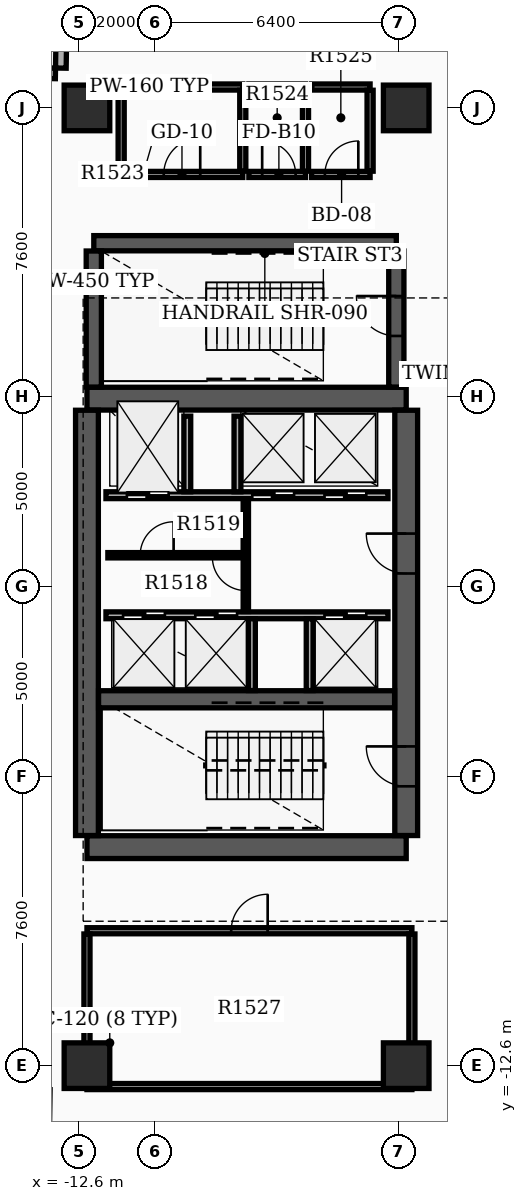
"""IFC4 building model, lengths in metres.
Left out: names, types, materials, properties, quantities, classifications, styles, units other than length and angle.
Written with IfcOpenShell. Run it as: python <this file> out.ifc"""

import sys

from ifc_helpers import new_model, si_unit, direction, frame, frame_2d, origin, origin_2d, place, context, subcontext, project, spatial, rectangle, extrude, element, fill, save


model = new_model("IFC4")
c1 = context("Model", 3, precision=1e-05, world=origin(), true_north=direction((0.0, 1.0)))
c2 = subcontext(c1, "Body", "Model", "MODEL_VIEW")
j1 = project(units=[si_unit("LENGTHUNIT", "METRE"), si_unit("PLANEANGLEUNIT", "RADIAN")], contexts=[c1])
p1 = place(None, origin())
s1 = spatial("IfcSite", under=j1, at=p1, CompositionType="ELEMENT")
p2 = place(p1, origin())
s2 = spatial("IfcBuilding", under=s1, at=p2, CompositionType="ELEMENT")
p3 = place(p2, frame((0.0, 0.0, 100.2)))
s3 = spatial("IfcBuildingStorey", under=s2, at=p3, CompositionType="ELEMENT", Elevation=100.2)
for number, where, z_axis, x_axis in (
    (1, (-12.4, -6.85, 0.0), (0.0, 0.0, 1.0), (1.0, 0.0, 0.0)),
    (2, (-12.4, 4.95, 0.0), (0.0, 0.0, 1.0), (1.0, 0.0, 0.0)),
):
    element("IfcWall", number, at=place(p3, frame(where, z_axis=z_axis, x_axis=x_axis)), inside=s3, PredefinedType="SHEAR", context=c2, shape_type="SweptSolid", body=[
        extrude(rectangle(XDim=8.4, YDim=0.6, at=frame_2d((4.2, 0.0))), origin(), (0.0, 0.0, 1.0), 4.3),
    ])
p4 = place(p3, frame((-12.4, -6.545, 0.0), z_axis=(0.0, 0.0, 1.0), x_axis=(0.0, 1.0, 0.0)))
e3 = element("IfcWall", 3, at=p4, inside=s3, PredefinedType="SHEAR", context=c2, shape_type="SweptSolid", body=[
    extrude(rectangle(XDim=11.19, YDim=0.6, at=frame_2d((5.595, 0.0))), origin(), (0.0, 0.0, 1.0), 4.3),
])
p5 = place(p3, frame((-4.0, -6.545, 0.0), z_axis=(0.0, 0.0, 1.0), x_axis=(0.0, 1.0, 0.0)))
e4 = element("IfcWall", 4, at=p5, inside=s3, PredefinedType="SHEAR", context=c2, shape_type="SweptSolid", body=[
    extrude(rectangle(XDim=11.19, YDim=0.6, at=frame_2d((5.595, 0.0))), origin(), (0.0, 0.0, 1.0), 4.3),
])
p6 = place(p5, frame((1.295, 0.0, 0.0)))
e5 = element("IfcOpeningElement", 5, at=p6, cuts=e4, PredefinedType="OPENING", context=c2, shape_type="SweptSolid", body=[
    extrude(rectangle(XDim=1.05, YDim=2.15, at=frame_2d((0.525, 1.075))), frame((0.0, 0.31, 0.0), z_axis=(0.0, -1.0, 0.0), x_axis=(1.0, 0.0, 0.0)), (0.0, 0.0, 1.0), 0.62),
])
p7 = place(p5, frame((6.895, 0.0, 0.0)))
e6 = element("IfcOpeningElement", 6, at=p7, cuts=e4, PredefinedType="OPENING", context=c2, shape_type="SweptSolid", body=[
    extrude(rectangle(XDim=1.05, YDim=2.15, at=frame_2d((0.525, 1.075))), frame((0.0, 0.31, 0.0), z_axis=(0.0, -1.0, 0.0), x_axis=(1.0, 0.0, 0.0)), (0.0, 0.0, 1.0), 0.62),
])
p8 = place(p3, frame((-12.095, -2.96, 0.0), z_axis=(0.0, 0.0, 1.0), x_axis=(1.0, 0.0, 0.0)))
e7 = element("IfcWall", 7, at=p8, inside=s3, PredefinedType="SHEAR", context=c2, shape_type="SweptSolid", body=[
    extrude(rectangle(XDim=7.79, YDim=0.45, at=frame_2d((3.895, 0.0))), origin(), (0.0, 0.0, 1.0), 4.3),
])
p9 = place(p3, frame((-12.22, 9.04, 0.0), z_axis=(0.0, 0.0, 1.0), x_axis=(1.0, 0.0, 0.0)))
e8 = element("IfcWall", 8, at=p9, inside=s3, PredefinedType="SHEAR", context=c2, shape_type="SweptSolid", body=[
    extrude(rectangle(XDim=7.96, YDim=0.4, at=frame_2d((3.98, 0.0))), origin(), (0.0, 0.0, 1.0), 4.3),
])
p10 = place(p3, frame((-12.22, 5.255, 0.0), z_axis=(0.0, 0.0, 1.0), x_axis=(0.0, 1.0, 0.0)))
e9 = element("IfcWall", 9, at=p10, inside=s3, PredefinedType="SHEAR", context=c2, shape_type="SweptSolid", body=[
    extrude(rectangle(XDim=3.58, YDim=0.4, at=frame_2d((1.79, 0.0))), origin(), (0.0, 0.0, 1.0), 4.3),
])
p11 = place(p3, frame((-4.26, 5.255, 0.0), z_axis=(0.0, 0.0, 1.0), x_axis=(0.0, 1.0, 0.0)))
e10 = element("IfcWall", 10, at=p11, inside=s3, PredefinedType="SHEAR", context=c2, shape_type="SweptSolid", body=[
    extrude(rectangle(XDim=3.58, YDim=0.4, at=frame_2d((1.79, 0.0))), origin(), (0.0, 0.0, 1.0), 4.3),
])
p12 = place(p11, frame((1.345, 0.0, 0.0)))
e11 = element("IfcOpeningElement", 11, at=p12, cuts=e10, PredefinedType="OPENING", context=c2, shape_type="SweptSolid", body=[
    extrude(rectangle(XDim=1.05, YDim=2.15, at=frame_2d((0.525, 1.075))), frame((0.0, 0.21, 0.0), z_axis=(0.0, -1.0, 0.0), x_axis=(1.0, 0.0, 0.0)), (0.0, 0.0, 1.0), 0.42),
])
for number, where, z_axis, x_axis in (
    (12, (-12.4, -12.6, 0.0), (0.0, 0.0, 1.0), (1.0, 0.0, 0.0)),
    (13, (-12.4, 12.6, 0.0), (0.0, 0.0, 1.0), (1.0, 0.0, 0.0)),
    (14, (-4.0, -12.6, 0.0), (0.0, 0.0, 1.0), (1.0, 0.0, 0.0)),
    (15, (-4.0, 12.6, 0.0), (0.0, 0.0, 1.0), (1.0, 0.0, 0.0)),
):
    element("IfcColumn", number, at=place(p3, frame(where, z_axis=z_axis, x_axis=x_axis)), inside=s3, PredefinedType="COLUMN", context=c2, shape_type="SweptSolid", body=[
        extrude(rectangle(XDim=1.2, YDim=1.2, at=origin_2d()), origin(), (0.0, 0.0, 1.0), 4.5),
    ])
p13 = place(p3, frame((-14.449, 13.529, 0.0), z_axis=(0.0, 0.0, 1.0), x_axis=(0.999878147354, -0.015610587569, 0.0)))
e16 = element("IfcWall", 16, at=p13, inside=s3, PredefinedType="STANDARD", context=c2, shape_type="SweptSolid", body=[
    extrude(rectangle(XDim=1.22, YDim=0.28, at=frame_2d((0.61, 0.0))), origin(), (0.0, 0.0, 1.0), 3.38),
])
p14 = place(p3, frame((-13.087, 13.647, 0.0), z_axis=(0.0, 0.0, 1.0), x_axis=(0.015785793208, 0.999875396603, 0.0)))
e17 = element("IfcWall", 17, at=p14, inside=s3, PredefinedType="STANDARD", context=c2, shape_type="SweptSolid", body=[
    extrude(rectangle(XDim=1.5, YDim=0.28, at=frame_2d((0.75, 0.0))), origin(), (0.0, 0.0, 1.0), 3.38),
])
p15 = place(p3, frame((-11.9, 2.41, 0.0), z_axis=(0.0, 0.0, 1.0), x_axis=(1.0, 0.0, 0.0)))
e18 = element("IfcWall", 18, at=p15, inside=s3, PredefinedType="SOLIDWALL", context=c2, shape_type="SweptSolid", body=[
    extrude(rectangle(XDim=7.42, YDim=0.18, at=frame_2d((3.71, 0.0))), origin(), (0.0, 0.0, 1.0), 3.37),
])
p16 = place(p15, frame((0.55, 0.0, 0.0)))
e19 = element("IfcOpeningElement", 19, at=p16, cuts=e18, PredefinedType="OPENING", context=c2, shape_type="SweptSolid", body=[
    extrude(rectangle(XDim=1.1, YDim=2.15, at=frame_2d((0.55, 1.075))), frame((0.0, 0.1, 0.0), z_axis=(0.0, -1.0, 0.0), x_axis=(1.0, 0.0, 0.0)), (0.0, 0.0, 1.0), 0.2),
])
p17 = place(p15, frame((3.85, 0.0, 0.0)))
e20 = element("IfcOpeningElement", 20, at=p17, cuts=e18, PredefinedType="OPENING", context=c2, shape_type="SweptSolid", body=[
    extrude(rectangle(XDim=1.1, YDim=2.15, at=frame_2d((0.55, 1.075))), frame((0.0, 0.1, 0.0), z_axis=(0.0, -1.0, 0.0), x_axis=(1.0, 0.0, 0.0)), (0.0, 0.0, 1.0), 0.2),
])
p18 = place(p15, frame((5.75, 0.0, 0.0)))
e21 = element("IfcOpeningElement", 21, at=p18, cuts=e18, PredefinedType="OPENING", context=c2, shape_type="SweptSolid", body=[
    extrude(rectangle(XDim=1.1, YDim=2.15, at=frame_2d((0.55, 1.075))), frame((0.0, 0.1, 0.0), z_axis=(0.0, -1.0, 0.0), x_axis=(1.0, 0.0, 0.0)), (0.0, 0.0, 1.0), 0.2),
])
p19 = place(p3, frame((-11.9, -0.75, 0.0), z_axis=(0.0, 0.0, 1.0), x_axis=(1.0, 0.0, 0.0)))
e22 = element("IfcWall", 22, at=p19, inside=s3, PredefinedType="SOLIDWALL", context=c2, shape_type="SweptSolid", body=[
    extrude(rectangle(XDim=7.42, YDim=0.18, at=frame_2d((3.71, 0.0))), origin(), (0.0, 0.0, 1.0), 3.37),
])
p20 = place(p19, frame((0.45, 0.0, 0.0)))
e23 = element("IfcOpeningElement", 23, at=p20, cuts=e22, PredefinedType="OPENING", context=c2, shape_type="SweptSolid", body=[
    extrude(rectangle(XDim=1.1, YDim=2.15, at=frame_2d((0.55, 1.075))), frame((0.0, 0.1, 0.0), z_axis=(0.0, -1.0, 0.0), x_axis=(1.0, 0.0, 0.0)), (0.0, 0.0, 1.0), 0.2),
])
p21 = place(p19, frame((2.35, 0.0, 0.0)))
e24 = element("IfcOpeningElement", 24, at=p21, cuts=e22, PredefinedType="OPENING", context=c2, shape_type="SweptSolid", body=[
    extrude(rectangle(XDim=1.1, YDim=2.15, at=frame_2d((0.55, 1.075))), frame((0.0, 0.1, 0.0), z_axis=(0.0, -1.0, 0.0), x_axis=(1.0, 0.0, 0.0)), (0.0, 0.0, 1.0), 0.2),
])
p22 = place(p19, frame((5.75, 0.0, 0.0)))
e25 = element("IfcOpeningElement", 25, at=p22, cuts=e22, PredefinedType="OPENING", context=c2, shape_type="SweptSolid", body=[
    extrude(rectangle(XDim=1.1, YDim=2.15, at=frame_2d((0.55, 1.075))), frame((0.0, 0.1, 0.0), z_axis=(0.0, -1.0, 0.0), x_axis=(1.0, 0.0, 0.0)), (0.0, 0.0, 1.0), 0.2),
])
for number, where, z_axis, x_axis in (
    (26, (-9.76, 2.5, 0.0), (0.0, 0.0, 1.0), (0.0, 1.0, 0.0)),
    (27, (-8.44, 2.5, 0.0), (0.0, 0.0, 1.0), (0.0, 1.0, 0.0)),
):
    element("IfcWall", number, at=place(p3, frame(where, z_axis=z_axis, x_axis=x_axis)), inside=s3, PredefinedType="SOLIDWALL", context=c2, shape_type="SweptSolid", body=[
        extrude(rectangle(XDim=1.99, YDim=0.18, at=frame_2d((0.995, 0.0))), origin(), (0.0, 0.0, 1.0), 3.37),
    ])
for number, where, z_axis, x_axis in (
    (28, (-8.06, -2.73, 0.0), (0.0, 0.0, 1.0), (0.0, 1.0, 0.0)),
    (29, (-6.54, -2.73, 0.0), (0.0, 0.0, 1.0), (0.0, 1.0, 0.0)),
):
    element("IfcWall", number, at=place(p3, frame(where, z_axis=z_axis, x_axis=x_axis)), inside=s3, PredefinedType="SOLIDWALL", context=c2, shape_type="SweptSolid", body=[
        extrude(rectangle(XDim=1.89, YDim=0.18, at=frame_2d((0.945, 0.0))), origin(), (0.0, 0.0, 1.0), 3.37),
    ])
p23 = place(p3, frame((-8.22, -0.65, 0.0), z_axis=(0.0, 0.0, 1.0), x_axis=(0.0, 1.0, 0.0)))
e30 = element("IfcWall", 30, at=p23, inside=s3, PredefinedType="SOLIDWALL", context=c2, shape_type="SweptSolid", body=[
    extrude(rectangle(XDim=2.96, YDim=0.14, at=frame_2d((1.48, 0.0))), origin(), (0.0, 0.0, 1.0), 3.37),
])
p24 = place(p23, frame((0.55, 0.0, 0.0)))
e31 = element("IfcOpeningElement", 31, at=p24, cuts=e30, PredefinedType="OPENING", context=c2, shape_type="SweptSolid", body=[
    extrude(rectangle(XDim=0.88, YDim=2.1, at=frame_2d((0.44, 1.05))), frame((0.0, 0.08, 0.0), z_axis=(0.0, -1.0, 0.0), x_axis=(1.0, 0.0, 0.0)), (0.0, 0.0, 1.0), 0.16),
])
p25 = place(p3, frame((-11.85, 0.83, 0.0), z_axis=(0.0, 0.0, 1.0), x_axis=(1.0, 0.0, 0.0)))
e32 = element("IfcWall", 32, at=p25, inside=s3, PredefinedType="PARTITIONING", context=c2, shape_type="SweptSolid", body=[
    extrude(rectangle(XDim=3.552, YDim=0.14, at=frame_2d((1.776, 0.0))), origin(), (0.0, 0.0, 1.0), 3.37),
])
p26 = place(p25, frame((0.85, 0.0, 0.0)))
e33 = element("IfcOpeningElement", 33, at=p26, cuts=e32, PredefinedType="OPENING", context=c2, shape_type="SweptSolid", body=[
    extrude(rectangle(XDim=0.88, YDim=2.1, at=frame_2d((0.44, 1.05))), frame((0.0, 0.08, 0.0), z_axis=(0.0, -1.0, 0.0), x_axis=(1.0, 0.0, 0.0)), (0.0, 0.0, 1.0), 0.16),
])
p27 = place(p3, frame((-11.5, 10.85, 0.0), z_axis=(0.0, 0.0, 1.0), x_axis=(1.0, 0.0, 0.0)))
e34 = element("IfcWall", 34, at=p27, inside=s3, PredefinedType="PARTITIONING", context=c2, shape_type="SweptSolid", body=[
    extrude(rectangle(XDim=3.2, YDim=0.16, at=frame_2d((1.6, 0.0))), origin(), (0.0, 0.0, 1.0), 3.37),
])
p28 = place(p27, frame((1.12, 0.0, 0.0)))
e35 = element("IfcOpeningElement", 35, at=p28, cuts=e34, PredefinedType="OPENING", context=c2, shape_type="SweptSolid", body=[
    extrude(rectangle(XDim=0.96, YDim=2.15, at=frame_2d((0.48, 1.075))), frame((0.0, 0.09, 0.0), z_axis=(0.0, -1.0, 0.0), x_axis=(1.0, 0.0, 0.0)), (0.0, 0.0, 1.0), 0.18),
])
p29 = place(p3, frame((-11.5, 13.15, 0.0), z_axis=(0.0, 0.0, 1.0), x_axis=(1.0, 0.0, 0.0)))
e36 = element("IfcWall", 36, at=p29, inside=s3, PredefinedType="PARTITIONING", context=c2, shape_type="SweptSolid", body=[
    extrude(rectangle(XDim=3.2, YDim=0.16, at=frame_2d((1.6, 0.0))), origin(), (0.0, 0.0, 1.0), 3.37),
])
for number, where, z_axis, x_axis in (
    (37, (-11.5, 10.935, 0.0), (0.0, 0.0, 1.0), (0.0, 1.0, 0.0)),
    (38, (-8.3, 10.935, 0.0), (0.0, 0.0, 1.0), (0.0, 1.0, 0.0)),
):
    element("IfcWall", number, at=place(p3, frame(where, z_axis=z_axis, x_axis=x_axis)), inside=s3, PredefinedType="PARTITIONING", context=c2, shape_type="SweptSolid", body=[
        extrude(rectangle(XDim=2.13, YDim=0.16, at=frame_2d((1.065, 0.0))), origin(), (0.0, 0.0, 1.0), 3.37),
    ])
p30 = place(p3, frame((-8.14, 10.85, 0.0), z_axis=(0.0, 0.0, 1.0), x_axis=(1.0, 0.0, 0.0)))
e39 = element("IfcWall", 39, at=p30, inside=s3, PredefinedType="PARTITIONING", context=c2, shape_type="SweptSolid", body=[
    extrude(rectangle(XDim=1.49, YDim=0.16, at=frame_2d((0.745, 0.0))), origin(), (0.0, 0.0, 1.0), 3.37),
])
p31 = place(p30, frame((0.35, 0.0, 0.0)))
e40 = element("IfcOpeningElement", 40, at=p31, cuts=e39, PredefinedType="OPENING", context=c2, shape_type="SweptSolid", body=[
    extrude(rectangle(XDim=0.88, YDim=2.1, at=frame_2d((0.44, 1.05))), frame((0.0, 0.09, 0.0), z_axis=(0.0, -1.0, 0.0), x_axis=(1.0, 0.0, 0.0)), (0.0, 0.0, 1.0), 0.18),
])
p32 = place(p3, frame((-8.14, 13.15, 0.0), z_axis=(0.0, 0.0, 1.0), x_axis=(1.0, 0.0, 0.0)))
e41 = element("IfcWall", 41, at=p32, inside=s3, PredefinedType="PARTITIONING", context=c2, shape_type="SweptSolid", body=[
    extrude(rectangle(XDim=1.49, YDim=0.16, at=frame_2d((0.745, 0.0))), origin(), (0.0, 0.0, 1.0), 3.37),
])
p33 = place(p3, frame((-6.65, 10.935, 0.0), z_axis=(0.0, 0.0, 1.0), x_axis=(0.0, 1.0, 0.0)))
e42 = element("IfcWall", 42, at=p33, inside=s3, PredefinedType="PARTITIONING", context=c2, shape_type="SweptSolid", body=[
    extrude(rectangle(XDim=2.13, YDim=0.16, at=frame_2d((1.065, 0.0))), origin(), (0.0, 0.0, 1.0), 3.37),
])
p34 = place(p3, frame((-6.49, 10.85, 0.0), z_axis=(0.0, 0.0, 1.0), x_axis=(1.0, 0.0, 0.0)))
e43 = element("IfcWall", 43, at=p34, inside=s3, PredefinedType="PARTITIONING", context=c2, shape_type="SweptSolid", body=[
    extrude(rectangle(XDim=1.54, YDim=0.16, at=frame_2d((0.77, 0.0))), origin(), (0.0, 0.0, 1.0), 3.37),
])
p35 = place(p34, frame((0.35, 0.0, 0.0)))
e44 = element("IfcOpeningElement", 44, at=p35, cuts=e43, PredefinedType="OPENING", context=c2, shape_type="SweptSolid", body=[
    extrude(rectangle(XDim=0.88, YDim=2.15, at=frame_2d((0.44, 1.075))), frame((0.0, 0.09, 0.0), z_axis=(0.0, -1.0, 0.0), x_axis=(1.0, 0.0, 0.0)), (0.0, 0.0, 1.0), 0.18),
])
p36 = place(p3, frame((-6.49, 13.15, 0.0), z_axis=(0.0, 0.0, 1.0), x_axis=(1.0, 0.0, 0.0)))
e45 = element("IfcWall", 45, at=p36, inside=s3, PredefinedType="PARTITIONING", context=c2, shape_type="SweptSolid", body=[
    extrude(rectangle(XDim=1.54, YDim=0.16, at=frame_2d((0.77, 0.0))), origin(), (0.0, 0.0, 1.0), 3.37),
])
p37 = place(p3, frame((-4.95, 10.935, 0.0), z_axis=(0.0, 0.0, 1.0), x_axis=(0.0, 1.0, 0.0)))
e46 = element("IfcWall", 46, at=p37, inside=s3, PredefinedType="PARTITIONING", context=c2, shape_type="SweptSolid", body=[
    extrude(rectangle(XDim=2.13, YDim=0.16, at=frame_2d((1.065, 0.0))), origin(), (0.0, 0.0, 1.0), 3.37),
])
p38 = place(p3, frame((-12.4, -13.15, 0.0), z_axis=(0.0, 0.0, 1.0), x_axis=(1.0, 0.0, 0.0)))
e47 = element("IfcWall", 47, at=p38, inside=s3, PredefinedType="PARTITIONING", context=c2, shape_type="SweptSolid", body=[
    extrude(rectangle(XDim=8.55, YDim=0.16, at=frame_2d((4.275, 0.0))), origin(), (0.0, 0.0, 1.0), 3.37),
])
p39 = place(p3, frame((-12.4, -9.05, 0.0), z_axis=(0.0, 0.0, 1.0), x_axis=(1.0, 0.0, 0.0)))
e48 = element("IfcWall", 48, at=p39, inside=s3, PredefinedType="PARTITIONING", context=c2, shape_type="SweptSolid", body=[
    extrude(rectangle(XDim=8.55, YDim=0.16, at=frame_2d((4.275, 0.0))), origin(), (0.0, 0.0, 1.0), 3.37),
])
p40 = place(p39, frame((3.795, 0.0, 0.0)))
e49 = element("IfcOpeningElement", 49, at=p40, cuts=e48, PredefinedType="OPENING", context=c2, shape_type="SweptSolid", body=[
    extrude(rectangle(XDim=0.96, YDim=2.15, at=frame_2d((0.48, 1.075))), frame((0.0, 0.09, 0.0), z_axis=(0.0, -1.0, 0.0), x_axis=(1.0, 0.0, 0.0)), (0.0, 0.0, 1.0), 0.18),
])
for number, where, z_axis, x_axis in (
    (50, (-12.4, -13.065, 0.0), (0.0, 0.0, 1.0), (0.0, 1.0, 0.0)),
    (51, (-3.85, -13.065, 0.0), (0.0, 0.0, 1.0), (0.0, 1.0, 0.0)),
):
    element("IfcWall", number, at=place(p3, frame(where, z_axis=z_axis, x_axis=x_axis)), inside=s3, PredefinedType="PARTITIONING", context=c2, shape_type="SweptSolid", body=[
        extrude(rectangle(XDim=3.93, YDim=0.16, at=frame_2d((1.965, 0.0))), origin(), (0.0, 0.0, 1.0), 3.37),
    ])
p41 = place(p6, origin())
e52 = element("IfcDoor", 52, at=p41, inside=s3, OperationType="SINGLE_SWING_RIGHT", PredefinedType="DOOR", context=c2, shape_type="SweptSolid", body=[
    extrude(rectangle(XDim=1.05, YDim=2.15, at=frame_2d((0.525, 1.075))), frame((0.0, 0.025, 0.0), z_axis=(0.0, -1.0, 0.0), x_axis=(1.0, 0.0, 0.0)), (0.0, 0.0, 1.0), 0.05),
])
fill(e5, e52)
p42 = place(p7, origin())
e53 = element("IfcDoor", 53, at=p42, inside=s3, OperationType="SINGLE_SWING_RIGHT", PredefinedType="DOOR", context=c2, shape_type="SweptSolid", body=[
    extrude(rectangle(XDim=1.05, YDim=2.15, at=frame_2d((0.525, 1.075))), frame((0.0, 0.025, 0.0), z_axis=(0.0, -1.0, 0.0), x_axis=(1.0, 0.0, 0.0)), (0.0, 0.0, 1.0), 0.05),
])
fill(e6, e53)
p43 = place(p12, origin())
e54 = element("IfcDoor", 54, at=p43, inside=s3, OperationType="SINGLE_SWING_RIGHT", PredefinedType="DOOR", context=c2, shape_type="SweptSolid", body=[
    extrude(rectangle(XDim=1.05, YDim=2.15, at=frame_2d((0.525, 1.075))), frame((0.0, 0.025, 0.0), z_axis=(0.0, -1.0, 0.0), x_axis=(1.0, 0.0, 0.0)), (0.0, 0.0, 1.0), 0.05),
])
fill(e11, e54)
p44 = place(p16, origin())
e55 = element("IfcDoor", 55, at=p44, inside=s3, OperationType="DOUBLE_DOOR_SLIDING", PredefinedType="DOOR", context=c2, shape_type="SweptSolid", body=[
    extrude(rectangle(XDim=1.1, YDim=2.15, at=frame_2d((0.55, 1.075))), frame((0.0, 0.025, 0.0), z_axis=(0.0, -1.0, 0.0), x_axis=(1.0, 0.0, 0.0)), (0.0, 0.0, 1.0), 0.05),
])
fill(e19, e55)
p45 = place(p17, origin())
e56 = element("IfcDoor", 56, at=p45, inside=s3, OperationType="DOUBLE_DOOR_SLIDING", PredefinedType="DOOR", context=c2, shape_type="SweptSolid", body=[
    extrude(rectangle(XDim=1.1, YDim=2.15, at=frame_2d((0.55, 1.075))), frame((0.0, 0.025, 0.0), z_axis=(0.0, -1.0, 0.0), x_axis=(1.0, 0.0, 0.0)), (0.0, 0.0, 1.0), 0.05),
])
fill(e20, e56)
p46 = place(p18, origin())
e57 = element("IfcDoor", 57, at=p46, inside=s3, OperationType="DOUBLE_DOOR_SLIDING", PredefinedType="DOOR", context=c2, shape_type="SweptSolid", body=[
    extrude(rectangle(XDim=1.1, YDim=2.15, at=frame_2d((0.55, 1.075))), frame((0.0, 0.025, 0.0), z_axis=(0.0, -1.0, 0.0), x_axis=(1.0, 0.0, 0.0)), (0.0, 0.0, 1.0), 0.05),
])
fill(e21, e57)
p47 = place(p20, origin())
e58 = element("IfcDoor", 58, at=p47, inside=s3, OperationType="DOUBLE_DOOR_SLIDING", PredefinedType="DOOR", context=c2, shape_type="SweptSolid", body=[
    extrude(rectangle(XDim=1.1, YDim=2.15, at=frame_2d((0.55, 1.075))), frame((0.0, 0.025, 0.0), z_axis=(0.0, -1.0, 0.0), x_axis=(1.0, 0.0, 0.0)), (0.0, 0.0, 1.0), 0.05),
])
fill(e23, e58)
p48 = place(p21, origin())
e59 = element("IfcDoor", 59, at=p48, inside=s3, OperationType="DOUBLE_DOOR_SLIDING", PredefinedType="DOOR", context=c2, shape_type="SweptSolid", body=[
    extrude(rectangle(XDim=1.1, YDim=2.15, at=frame_2d((0.55, 1.075))), frame((0.0, 0.025, 0.0), z_axis=(0.0, -1.0, 0.0), x_axis=(1.0, 0.0, 0.0)), (0.0, 0.0, 1.0), 0.05),
])
fill(e24, e59)
p49 = place(p22, origin())
e60 = element("IfcDoor", 60, at=p49, inside=s3, OperationType="DOUBLE_DOOR_SLIDING", PredefinedType="DOOR", context=c2, shape_type="SweptSolid", body=[
    extrude(rectangle(XDim=1.1, YDim=2.15, at=frame_2d((0.55, 1.075))), frame((0.0, 0.025, 0.0), z_axis=(0.0, -1.0, 0.0), x_axis=(1.0, 0.0, 0.0)), (0.0, 0.0, 1.0), 0.05),
])
fill(e25, e60)
p50 = place(p24, origin())
e61 = element("IfcDoor", 61, at=p50, inside=s3, OperationType="SINGLE_SWING_RIGHT", PredefinedType="DOOR", context=c2, shape_type="SweptSolid", body=[
    extrude(rectangle(XDim=0.88, YDim=2.1, at=frame_2d((0.44, 1.05))), frame((0.0, 0.025, 0.0), z_axis=(0.0, -1.0, 0.0), x_axis=(1.0, 0.0, 0.0)), (0.0, 0.0, 1.0), 0.05),
])
fill(e31, e61)
p51 = place(p26, origin())
e62 = element("IfcDoor", 62, at=p51, inside=s3, OperationType="SINGLE_SWING_RIGHT", PredefinedType="DOOR", context=c2, shape_type="SweptSolid", body=[
    extrude(rectangle(XDim=0.88, YDim=2.1, at=frame_2d((0.44, 1.05))), frame((0.0, 0.025, 0.0), z_axis=(0.0, -1.0, 0.0), x_axis=(1.0, 0.0, 0.0)), (0.0, 0.0, 1.0), 0.05),
])
fill(e33, e62)
p52 = place(p28, origin())
e63 = element("IfcDoor", 63, at=p52, inside=s3, OperationType="SINGLE_SWING_RIGHT", PredefinedType="DOOR", context=c2, shape_type="SweptSolid", body=[
    extrude(rectangle(XDim=0.96, YDim=2.15, at=frame_2d((0.48, 1.075))), frame((0.0, 0.025, 0.0), z_axis=(0.0, -1.0, 0.0), x_axis=(1.0, 0.0, 0.0)), (0.0, 0.0, 1.0), 0.05),
])
fill(e35, e63)
p53 = place(p31, origin())
e64 = element("IfcDoor", 64, at=p53, inside=s3, OperationType="SINGLE_SWING_LEFT", PredefinedType="DOOR", context=c2, shape_type="SweptSolid", body=[
    extrude(rectangle(XDim=0.88, YDim=2.1, at=frame_2d((0.44, 1.05))), frame((0.0, 0.025, 0.0), z_axis=(0.0, -1.0, 0.0), x_axis=(1.0, 0.0, 0.0)), (0.0, 0.0, 1.0), 0.05),
])
fill(e40, e64)
p54 = place(p35, origin())
e65 = element("IfcDoor", 65, at=p54, inside=s3, OperationType="SINGLE_SWING_RIGHT", PredefinedType="DOOR", context=c2, shape_type="SweptSolid", body=[
    extrude(rectangle(XDim=0.88, YDim=2.15, at=frame_2d((0.44, 1.075))), frame((0.0, 0.025, 0.0), z_axis=(0.0, -1.0, 0.0), x_axis=(1.0, 0.0, 0.0)), (0.0, 0.0, 1.0), 0.05),
])
fill(e44, e65)
p55 = place(p40, origin())
e66 = element("IfcDoor", 66, at=p55, inside=s3, OperationType="SINGLE_SWING_RIGHT", PredefinedType="DOOR", context=c2, shape_type="SweptSolid", body=[
    extrude(rectangle(XDim=0.96, YDim=2.15, at=frame_2d((0.48, 1.075))), frame((0.0, 0.025, 0.0), z_axis=(0.0, -1.0, 0.0), x_axis=(1.0, 0.0, 0.0)), (0.0, 0.0, 1.0), 0.05),
])
fill(e49, e66)
save(model, sys.argv[1])
